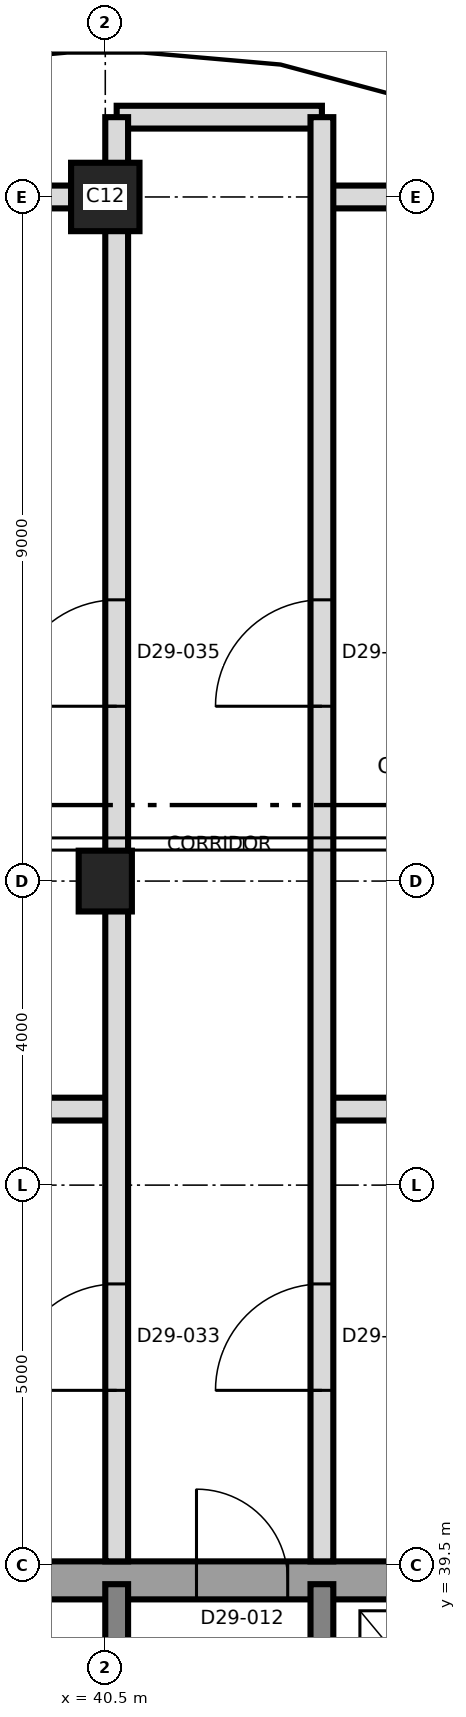
"""IFC4 building model, lengths in metres.
Left out: names, types, materials, properties, quantities, classifications, styles, units other than length and angle.
Written with IfcOpenShell. Run it as: python <this file> out.ifc"""

import sys

from ifc_helpers import new_model, si_unit, direction, frame, frame_2d, origin, origin_2d, place, context, subcontext, project, spatial, rectangle, extrude, element, fill, save


model = new_model("IFC4")
c1 = context("Model", 3, precision=1e-05, world=origin(), true_north=direction((0.0, 1.0)))
c2 = subcontext(c1, "Body", "Model", "MODEL_VIEW")
j1 = project(units=[si_unit("LENGTHUNIT", "METRE"), si_unit("PLANEANGLEUNIT", "RADIAN")], contexts=[c1])
p1 = place(None, origin())
s1 = spatial("IfcSite", under=j1, at=p1, CompositionType="ELEMENT")
p2 = place(p1, origin())
s2 = spatial("IfcBuilding", under=s1, at=p2, CompositionType="ELEMENT")
p3 = place(p2, frame((0.0, 0.0, 254.9)))
s3 = spatial("IfcBuildingStorey", under=s2, at=p3, CompositionType="ELEMENT", Elevation=254.9)
p4 = place(p3, frame((31.25, 39.3, 0.0), z_axis=(0.0, 0.0, 1.0), x_axis=(1.0, 0.0, 0.0)))
e1 = element("IfcWall", 1, at=p4, inside=s3, PredefinedType="SHEAR", context=c2, shape_type="SweptSolid", body=[
    extrude(rectangle(XDim=27.0, YDim=0.5, at=frame_2d((13.5, 0.0))), origin(), (0.0, 0.0, 1.0), 6.0),
])
p5 = place(p4, frame((10.45, 0.0, 0.0)))
e2 = element("IfcOpeningElement", 2, at=p5, cuts=e1, PredefinedType="OPENING", context=c2, shape_type="SweptSolid", body=[
    extrude(rectangle(XDim=1.2, YDim=2.1, at=frame_2d((0.6, 1.05))), frame((0.0, 0.26, 0.0), z_axis=(0.0, -1.0, 0.0), x_axis=(1.0, 0.0, 0.0)), (0.0, 0.0, 1.0), 0.52),
])
for number, where, z_axis, x_axis in (
    (3, (40.65, 33.5, 0.0), (0.0, 0.0, 1.0), (0.0, 1.0, 0.0)),
    (4, (43.35, 33.5, 0.0), (0.0, 0.0, 1.0), (0.0, 1.0, 0.0)),
):
    element("IfcWall", number, at=place(p3, frame(where, z_axis=z_axis, x_axis=x_axis)), inside=s3, PredefinedType="SHEAR", context=c2, shape_type="SweptSolid", body=[
        extrude(rectangle(XDim=5.75, YDim=0.3, at=frame_2d((2.875, 0.0))), origin(), (0.0, 0.0, 1.0), 6.0),
    ])
p6 = place(p3, frame((40.5, 48.5, 0.0), z_axis=(0.0, 0.0, 1.0), x_axis=(0.0, 1.0, 0.0)))
e5 = element("IfcColumn", 5, at=p6, inside=s3, PredefinedType="COLUMN", context=c2, shape_type="SweptSolid", body=[
    extrude(rectangle(XDim=0.8, YDim=0.7, at=origin_2d()), origin(), (0.0, 0.0, 1.0), 6.0),
])
p7 = place(p3, frame((40.5, 57.5, 0.0), z_axis=(0.0, 0.0, 1.0), x_axis=(1.0, 0.0, 0.0)))
e6 = element("IfcColumn", 6, at=p7, inside=s3, PredefinedType="COLUMN", context=c2, shape_type="SweptSolid", body=[
    extrude(rectangle(XDim=0.9, YDim=0.9, at=origin_2d()), origin(), (0.0, 0.0, 1.0), 6.0),
])
p8 = place(p3, frame((29.77, 45.5, 0.0), z_axis=(0.0, 0.0, 1.0), x_axis=(1.0, 0.0, 0.0)))
e7 = element("IfcWall", 7, at=p8, inside=s3, PredefinedType="PARTITIONING", context=c2, shape_type="SweptSolid", body=[
    extrude(rectangle(XDim=10.88, YDim=0.3, at=frame_2d((5.44, 0.0))), origin(), (0.0, 0.0, 1.0), 5.65),
])
p9 = place(p3, frame((43.35, 45.5, 0.0), z_axis=(0.0, 0.0, 1.0), x_axis=(1.0, 0.0, 0.0)))
e8 = element("IfcWall", 8, at=p9, inside=s3, PredefinedType="PARTITIONING", context=c2, shape_type="SweptSolid", body=[
    extrude(rectangle(XDim=7.88, YDim=0.3, at=frame_2d((3.94, 0.0))), origin(), (0.0, 0.0, 1.0), 5.65),
])
p10 = place(p3, frame((34.261, 57.5, 0.0), z_axis=(0.0, 0.0, 1.0), x_axis=(1.0, 0.0, 0.0)))
e9 = element("IfcWall", 9, at=p10, inside=s3, PredefinedType="PARTITIONING", context=c2, shape_type="SweptSolid", body=[
    extrude(rectangle(XDim=6.389, YDim=0.3, at=frame_2d((3.194, 0.0))), origin(), (0.0, 0.0, 1.0), 5.65),
])
p11 = place(p3, frame((43.35, 57.5, 0.0), z_axis=(0.0, 0.0, 1.0), x_axis=(1.0, 0.0, 0.0)))
e10 = element("IfcWall", 10, at=p11, inside=s3, PredefinedType="PARTITIONING", context=c2, shape_type="SweptSolid", body=[
    extrude(rectangle(XDim=3.389, YDim=0.3, at=frame_2d((1.694, 0.0))), origin(), (0.0, 0.0, 1.0), 5.65),
])
p12 = place(p3, frame((40.65, 58.55, 0.0), z_axis=(0.0, 0.0, 1.0), x_axis=(1.0, 0.0, 0.0)))
e11 = element("IfcWall", 11, at=p12, inside=s3, PredefinedType="PARTITIONING", context=c2, shape_type="SweptSolid", body=[
    extrude(rectangle(XDim=2.7, YDim=0.3, at=frame_2d((1.35, 0.0))), origin(), (0.0, 0.0, 1.0), 5.65),
])
p13 = place(p3, frame((40.65, 39.55, 0.0), z_axis=(0.0, 0.0, 1.0), x_axis=(0.0, 1.0, 0.0)))
e12 = element("IfcWall", 12, at=p13, inside=s3, PredefinedType="PARTITIONING", context=c2, shape_type="SweptSolid", body=[
    extrude(rectangle(XDim=19.0, YDim=0.3, at=frame_2d((9.5, 0.0))), origin(), (0.0, 0.0, 1.0), 5.65),
])
p14 = place(p13, frame((2.25, 0.0, 0.0)))
e13 = element("IfcOpeningElement", 13, at=p14, cuts=e12, PredefinedType="OPENING", context=c2, shape_type="SweptSolid", body=[
    extrude(rectangle(XDim=1.4, YDim=2.1, at=frame_2d((0.7, 1.05))), frame((0.0, 0.16, 0.0), z_axis=(0.0, -1.0, 0.0), x_axis=(1.0, 0.0, 0.0)), (0.0, 0.0, 1.0), 0.32),
])
p15 = place(p13, frame((11.25, 0.0, 0.0)))
e14 = element("IfcOpeningElement", 14, at=p15, cuts=e12, PredefinedType="OPENING", context=c2, shape_type="SweptSolid", body=[
    extrude(rectangle(XDim=1.4, YDim=2.1, at=frame_2d((0.7, 1.05))), frame((0.0, 0.16, 0.0), z_axis=(0.0, -1.0, 0.0), x_axis=(1.0, 0.0, 0.0)), (0.0, 0.0, 1.0), 0.32),
])
p16 = place(p3, frame((43.35, 39.55, 0.0), z_axis=(0.0, 0.0, 1.0), x_axis=(0.0, 1.0, 0.0)))
e15 = element("IfcWall", 15, at=p16, inside=s3, PredefinedType="PARTITIONING", context=c2, shape_type="SweptSolid", body=[
    extrude(rectangle(XDim=19.0, YDim=0.3, at=frame_2d((9.5, 0.0))), origin(), (0.0, 0.0, 1.0), 5.65),
])
p17 = place(p16, frame((2.25, 0.0, 0.0)))
e16 = element("IfcOpeningElement", 16, at=p17, cuts=e15, PredefinedType="OPENING", context=c2, shape_type="SweptSolid", body=[
    extrude(rectangle(XDim=1.4, YDim=2.1, at=frame_2d((0.7, 1.05))), frame((0.0, 0.16, 0.0), z_axis=(0.0, -1.0, 0.0), x_axis=(1.0, 0.0, 0.0)), (0.0, 0.0, 1.0), 0.32),
])
p18 = place(p16, frame((11.25, 0.0, 0.0)))
e17 = element("IfcOpeningElement", 17, at=p18, cuts=e15, PredefinedType="OPENING", context=c2, shape_type="SweptSolid", body=[
    extrude(rectangle(XDim=1.4, YDim=2.1, at=frame_2d((0.7, 1.05))), frame((0.0, 0.16, 0.0), z_axis=(0.0, -1.0, 0.0), x_axis=(1.0, 0.0, 0.0)), (0.0, 0.0, 1.0), 0.32),
])
p19 = place(p5, origin())
e18 = element("IfcDoor", 18, at=p19, inside=s3, OperationType="SINGLE_SWING_RIGHT", PredefinedType="DOOR", context=c2, shape_type="SweptSolid", body=[
    extrude(rectangle(XDim=1.2, YDim=2.1, at=frame_2d((0.6, 1.05))), frame((0.0, 0.025, 0.0), z_axis=(0.0, -1.0, 0.0), x_axis=(1.0, 0.0, 0.0)), (0.0, 0.0, 1.0), 0.05),
])
fill(e2, e18)
p20 = place(p17, origin())
e19 = element("IfcDoor", 19, at=p20, inside=s3, OperationType="SINGLE_SWING_LEFT", PredefinedType="DOOR", context=c2, shape_type="SweptSolid", body=[
    extrude(rectangle(XDim=1.4, YDim=2.1, at=frame_2d((0.7, 1.05))), frame((0.0, 0.025, 0.0), z_axis=(0.0, -1.0, 0.0), x_axis=(1.0, 0.0, 0.0)), (0.0, 0.0, 1.0), 0.05),
])
fill(e16, e19)
p21 = place(p14, origin())
e20 = element("IfcDoor", 20, at=p21, inside=s3, OperationType="SINGLE_SWING_LEFT", PredefinedType="DOOR", context=c2, shape_type="SweptSolid", body=[
    extrude(rectangle(XDim=1.4, YDim=2.1, at=frame_2d((0.7, 1.05))), frame((0.0, 0.025, 0.0), z_axis=(0.0, -1.0, 0.0), x_axis=(1.0, 0.0, 0.0)), (0.0, 0.0, 1.0), 0.05),
])
fill(e13, e20)
p22 = place(p18, origin())
e21 = element("IfcDoor", 21, at=p22, inside=s3, OperationType="SINGLE_SWING_LEFT", PredefinedType="DOOR", context=c2, shape_type="SweptSolid", body=[
    extrude(rectangle(XDim=1.4, YDim=2.1, at=frame_2d((0.7, 1.05))), frame((0.0, 0.025, 0.0), z_axis=(0.0, -1.0, 0.0), x_axis=(1.0, 0.0, 0.0)), (0.0, 0.0, 1.0), 0.05),
])
fill(e17, e21)
p23 = place(p15, origin())
e22 = element("IfcDoor", 22, at=p23, inside=s3, OperationType="SINGLE_SWING_LEFT", PredefinedType="DOOR", context=c2, shape_type="SweptSolid", body=[
    extrude(rectangle(XDim=1.4, YDim=2.1, at=frame_2d((0.7, 1.05))), frame((0.0, 0.025, 0.0), z_axis=(0.0, -1.0, 0.0), x_axis=(1.0, 0.0, 0.0)), (0.0, 0.0, 1.0), 0.05),
])
fill(e14, e22)
save(model, sys.argv[1])
